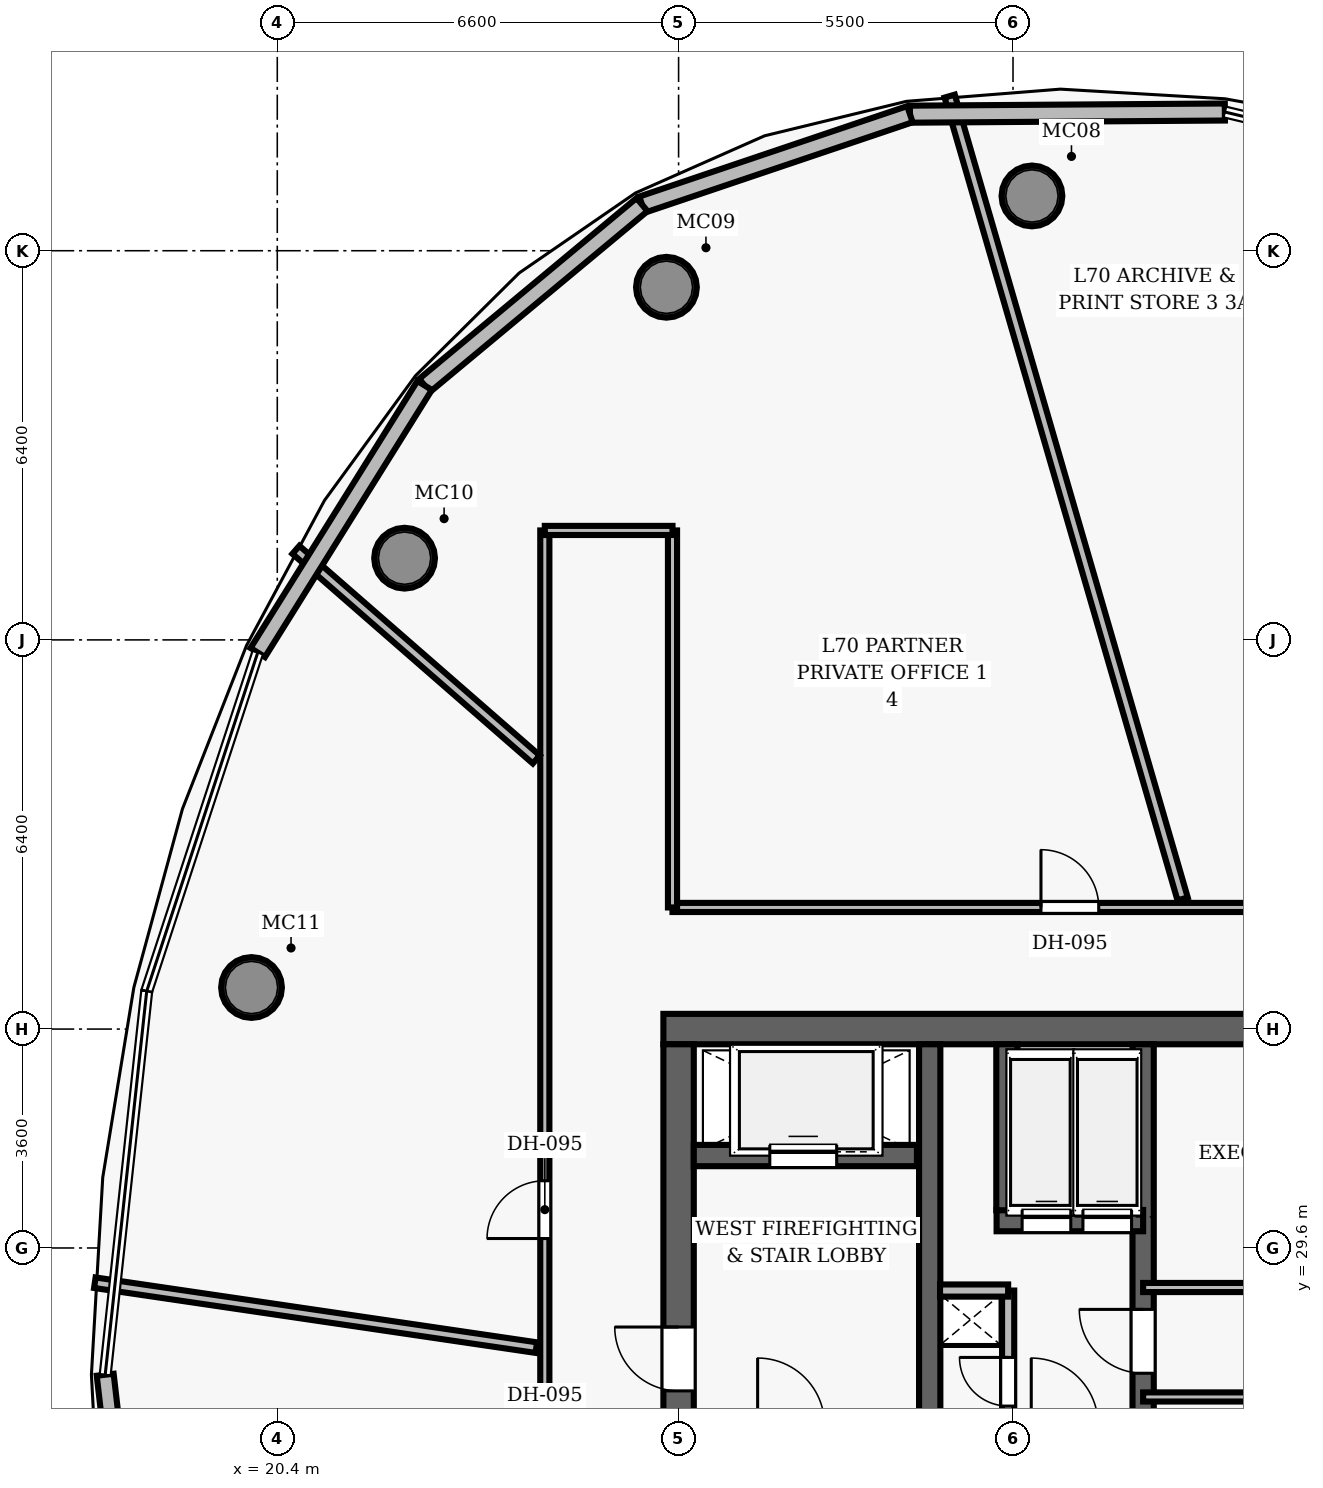
"""IFC4 building model, lengths in metres.
Left out: names, types, materials, properties, quantities, classifications, styles, units other than length and angle.
Written with IfcOpenShell. Run it as: python <this file> out.ifc"""

import sys

from ifc_helpers import new_model, si_unit, direction, frame, frame_2d, origin, origin_2d, place, context, subcontext, project, spatial, rectangle, hollow_circle, extrude, element, fill, save


model = new_model("IFC4")
c1 = context("Model", 3, precision=1e-05, world=origin(), true_north=direction((0.0, 1.0)))
c2 = subcontext(c1, "Body", "Model", "MODEL_VIEW")
j1 = project(units=[si_unit("LENGTHUNIT", "METRE"), si_unit("PLANEANGLEUNIT", "RADIAN")], contexts=[c1])
p1 = place(None, origin())
s1 = spatial("IfcSite", under=j1, at=p1, CompositionType="ELEMENT")
p2 = place(p1, origin())
s2 = spatial("IfcBuilding", under=s1, at=p2, CompositionType="ELEMENT")
p3 = place(p2, frame((0.0, 0.0, 276.7)))
s3 = spatial("IfcBuildingStorey", under=s2, at=p3, CompositionType="ELEMENT", Elevation=276.7)
p4 = place(p3, frame((26.75, 33.2, 0.0), z_axis=(0.0, 0.0, 1.0), x_axis=(1.0, 0.0, 0.0)))
e1 = element("IfcWall", 1, at=p4, inside=s3, PredefinedType="SHEAR", context=c2, shape_type="SweptSolid", body=[
    extrude(rectangle(XDim=22.5, YDim=0.5, at=frame_2d((11.25, 0.0))), origin(), (0.0, 0.0, 1.0), 3.85),
])
p5 = place(p3, frame((27.0, 19.05, 0.0), z_axis=(0.0, 0.0, 1.0), x_axis=(0.0, 1.0, 0.0)))
e2 = element("IfcWall", 2, at=p5, inside=s3, PredefinedType="SHEAR", context=c2, shape_type="SweptSolid", body=[
    extrude(rectangle(XDim=13.9, YDim=0.5, at=frame_2d((6.95, 0.0))), origin(), (0.0, 0.0, 1.0), 3.85),
])
p6 = place(p5, frame((8.2, 0.0, 0.0)))
e3 = element("IfcOpeningElement", 3, at=p6, cuts=e2, PredefinedType="OPENING", context=c2, shape_type="SweptSolid", body=[
    extrude(rectangle(XDim=1.05, YDim=2.15, at=frame_2d((0.525, 1.075))), frame((0.0, 0.26, 0.0), z_axis=(0.0, -1.0, 0.0), x_axis=(1.0, 0.0, 0.0)), (0.0, 0.0, 1.0), 0.52),
])
p7 = place(p3, frame((31.13, 19.05, 0.0), z_axis=(0.0, 0.0, 1.0), x_axis=(0.0, 1.0, 0.0)))
e4 = element("IfcWall", 4, at=p7, inside=s3, PredefinedType="SHEAR", context=c2, shape_type="SweptSolid", body=[
    extrude(rectangle(XDim=13.9, YDim=0.35, at=frame_2d((6.95, 0.0))), origin(), (0.0, 0.0, 1.0), 3.85),
])
for number, where, z_axis, x_axis in (
    (5, (32.812, 46.901, 0.0), (0.0, 0.0, 1.0), (1.0, 0.0, 0.0)),
    (6, (26.8, 45.399, 0.0), (0.0, 0.0, 1.0), (1.0, 0.0, 0.0)),
    (7, (22.494, 40.944, 0.0), (0.0, 0.0, 1.0), (1.0, 0.0, 0.0)),
    (8, (19.976, 33.884, 0.0), (0.0, 0.0, 1.0), (1.0, 0.0, 0.0)),
):
    element("IfcColumn", number, at=place(p3, frame(where, z_axis=z_axis, x_axis=x_axis)), inside=s3, PredefinedType="COLUMN", context=c2, shape_type="SweptSolid", body=[
        extrude(hollow_circle(Radius=0.5, WallThickness=0.045, at=origin_2d()), origin(), (0.0, 0.0, 1.0), 3.85),
    ])
p8 = place(p3, frame((27.25, 31.12, 0.0), z_axis=(0.0, 0.0, 1.0), x_axis=(1.0, 0.0, 0.0)))
e9 = element("IfcWall", 9, at=p8, inside=s3, PredefinedType="SHEAR", context=c2, shape_type="SweptSolid", body=[
    extrude(rectangle(XDim=3.67, YDim=0.35, at=frame_2d((1.835, 0.0))), origin(), (0.0, 0.0, 1.0), 3.04),
])
p9 = place(p8, frame((1.25, 0.0, 0.0)))
e10 = element("IfcOpeningElement", 10, at=p9, cuts=e9, PredefinedType="OPENING", context=c2, shape_type="SweptSolid", body=[
    extrude(rectangle(XDim=1.1, YDim=2.15, at=frame_2d((0.55, 1.075))), frame((0.0, 0.185, 0.0), z_axis=(0.0, -1.0, 0.0), x_axis=(1.0, 0.0, 0.0)), (0.0, 0.0, 1.0), 0.37),
])
p10 = place(p3, frame((34.64, 26.69, 0.0), z_axis=(0.0, 0.0, 1.0), x_axis=(0.0, 1.0, 0.0)))
e11 = element("IfcWall", 11, at=p10, inside=s3, PredefinedType="SHEAR", context=c2, shape_type="SweptSolid", body=[
    extrude(rectangle(XDim=6.26, YDim=0.35, at=frame_2d((3.13, 0.0))), origin(), (0.0, 0.0, 1.0), 3.85),
])
p11 = place(p10, frame((0.85, 0.0, 0.0)))
e12 = element("IfcOpeningElement", 12, at=p11, cuts=e11, PredefinedType="OPENING", context=c2, shape_type="SweptSolid", body=[
    extrude(rectangle(XDim=1.05, YDim=2.15, at=frame_2d((0.525, 1.075))), frame((0.0, 0.185, 0.0), z_axis=(0.0, -1.0, 0.0), x_axis=(1.0, 0.0, 0.0)), (0.0, 0.0, 1.0), 0.37),
])
p12 = place(p3, frame((32.23, 30.05, 0.0), z_axis=(0.0, 0.0, 1.0), x_axis=(1.0, 0.0, 0.0)))
e13 = element("IfcWall", 13, at=p12, inside=s3, PredefinedType="SHEAR", context=c2, shape_type="SweptSolid", body=[
    extrude(rectangle(XDim=2.41, YDim=0.35, at=frame_2d((1.205, 0.0))), origin(), (0.0, 0.0, 1.0), 3.04),
])
p13 = place(p12, frame((0.42, 0.0, 0.0)))
e14 = element("IfcOpeningElement", 14, at=p13, cuts=e13, PredefinedType="OPENING", context=c2, shape_type="SweptSolid", body=[
    extrude(rectangle(XDim=0.8, YDim=2.15, at=frame_2d((0.4, 1.075))), frame((0.0, 0.185, 0.0), z_axis=(0.0, -1.0, 0.0), x_axis=(1.0, 0.0, 0.0)), (0.0, 0.0, 1.0), 0.37),
])
p14 = place(p12, frame((1.42, 0.0, 0.0)))
e15 = element("IfcOpeningElement", 15, at=p14, cuts=e13, PredefinedType="OPENING", context=c2, shape_type="SweptSolid", body=[
    extrude(rectangle(XDim=0.8, YDim=2.15, at=frame_2d((0.4, 1.075))), frame((0.0, 0.185, 0.0), z_axis=(0.0, -1.0, 0.0), x_axis=(1.0, 0.0, 0.0)), (0.0, 0.0, 1.0), 0.37),
])
p15 = place(p3, frame((32.4, 30.22, 0.0), z_axis=(0.0, 0.0, 1.0), x_axis=(0.0, 1.0, 0.0)))
e16 = element("IfcWall", 16, at=p15, inside=s3, PredefinedType="SHEAR", context=c2, shape_type="SweptSolid", body=[
    extrude(rectangle(XDim=2.73, YDim=0.35, at=frame_2d((1.365, 0.0))), origin(), (0.0, 0.0, 1.0), 3.04),
])
p16 = place(p3, frame((32.42, 26.86, 0.0), z_axis=(0.0, 0.0, 1.0), x_axis=(0.0, 1.0, 0.0)))
e17 = element("IfcWall", 17, at=p16, inside=s3, PredefinedType="PARTITIONING", context=c2, shape_type="SweptSolid", body=[
    extrude(rectangle(XDim=2.04, YDim=0.2, at=frame_2d((1.02, 0.0))), origin(), (0.0, 0.0, 1.0), 3.04),
])
p17 = place(p16, frame((0.14, 0.0, 0.0)))
e18 = element("IfcOpeningElement", 18, at=p17, cuts=e17, PredefinedType="OPENING", context=c2, shape_type="SweptSolid", body=[
    extrude(rectangle(XDim=0.8, YDim=2.05, at=frame_2d((0.4, 1.025))), frame((0.0, 0.11, 0.0), z_axis=(0.0, -1.0, 0.0), x_axis=(1.0, 0.0, 0.0)), (0.0, 0.0, 1.0), 0.22),
])
p18 = place(p3, frame((31.3, 28.9, 0.0), z_axis=(0.0, 0.0, 1.0), x_axis=(1.0, 0.0, 0.0)))
e19 = element("IfcWall", 19, at=p18, inside=s3, PredefinedType="PARTITIONING", context=c2, shape_type="SweptSolid", body=[
    extrude(rectangle(XDim=1.12, YDim=0.2, at=frame_2d((0.56, 0.0))), origin(), (0.0, 0.0, 1.0), 3.04),
])
for number, where, z_axis, x_axis in (
    (20, (34.64, 27.15, 0.0), (0.0, 0.0, 1.0), (1.0, 0.0, 0.0)),
    (21, (34.64, 28.95, 0.0), (0.0, 0.0, 1.0), (1.0, 0.0, 0.0)),
):
    element("IfcWall", number, at=place(p3, frame(where, z_axis=z_axis, x_axis=x_axis)), inside=s3, PredefinedType="PARTITIONING", context=c2, shape_type="SweptSolid", body=[
        extrude(rectangle(XDim=6.36, YDim=0.15, at=frame_2d((3.18, 0.0))), origin(), (0.0, 0.0, 1.0), 3.04),
    ])
p19 = place(p3, frame((26.9, 35.2, 0.0), z_axis=(0.0, 0.0, 1.0), x_axis=(1.0, 0.0, 0.0)))
e22 = element("IfcWall", 22, at=p19, inside=s3, PredefinedType="PARTITIONING", context=c2, shape_type="SweptSolid", body=[
    extrude(rectangle(XDim=10.05, YDim=0.15, at=frame_2d((5.025, 0.0))), origin(), (0.0, 0.0, 1.0), 3.04),
])
p20 = place(p19, frame((6.06, 0.0, 0.0)))
e23 = element("IfcOpeningElement", 23, at=p20, cuts=e22, PredefinedType="OPENING", context=c2, shape_type="SweptSolid", body=[
    extrude(rectangle(XDim=0.95, YDim=2.15, at=frame_2d((0.475, 1.075))), frame((0.0, 0.085, 0.0), z_axis=(0.0, -1.0, 0.0), x_axis=(1.0, 0.0, 0.0)), (0.0, 0.0, 1.0), 0.17),
])
p21 = place(p3, frame((24.8, 10.6, 0.0), z_axis=(0.0, 0.0, 1.0), x_axis=(0.0, 1.0, 0.0)))
e24 = element("IfcWall", 24, at=p21, inside=s3, PredefinedType="PARTITIONING", context=c2, shape_type="SweptSolid", body=[
    extrude(rectangle(XDim=30.8, YDim=0.15, at=frame_2d((15.4, 0.0))), origin(), (0.0, 0.0, 1.0), 3.04),
])
p22 = place(p21, frame((19.156, 0.0, 0.0)))
e25 = element("IfcOpeningElement", 25, at=p22, cuts=e24, PredefinedType="OPENING", context=c2, shape_type="SweptSolid", body=[
    extrude(rectangle(XDim=0.95, YDim=2.15, at=frame_2d((0.475, 1.075))), frame((0.0, 0.085, 0.0), z_axis=(0.0, -1.0, 0.0), x_axis=(1.0, 0.0, 0.0)), (0.0, 0.0, 1.0), 0.17),
])
p23 = place(p21, frame((15.034, 0.0, 0.0)))
e26 = element("IfcOpeningElement", 26, at=p23, cuts=e24, PredefinedType="OPENING", context=c2, shape_type="SweptSolid", body=[
    extrude(rectangle(XDim=0.95, YDim=2.15, at=frame_2d((0.475, 1.075))), frame((0.0, 0.085, 0.0), z_axis=(0.0, -1.0, 0.0), x_axis=(1.0, 0.0, 0.0)), (0.0, 0.0, 1.0), 0.17),
])
p24 = place(p21, frame((1.941, 0.0, 0.0)))
e27 = element("IfcOpeningElement", 27, at=p24, cuts=e24, PredefinedType="OPENING", context=c2, shape_type="SweptSolid", body=[
    extrude(rectangle(XDim=0.95, YDim=2.15, at=frame_2d((0.475, 1.075))), frame((0.0, 0.085, 0.0), z_axis=(0.0, -1.0, 0.0), x_axis=(1.0, 0.0, 0.0)), (0.0, 0.0, 1.0), 0.17),
])
p25 = place(p3, frame((26.9, 35.2, 0.0), z_axis=(0.0, 0.0, 1.0), x_axis=(0.0, 1.0, 0.0)))
e28 = element("IfcWall", 28, at=p25, inside=s3, PredefinedType="PARTITIONING", context=c2, shape_type="SweptSolid", body=[
    extrude(rectangle(XDim=6.2, YDim=0.15, at=frame_2d((3.1, 0.0))), origin(), (0.0, 0.0, 1.0), 3.04),
])
p26 = place(p3, frame((24.8, 41.4, 0.0), z_axis=(0.0, 0.0, 1.0), x_axis=(1.0, 0.0, 0.0)))
e29 = element("IfcWall", 29, at=p26, inside=s3, PredefinedType="PARTITIONING", context=c2, shape_type="SweptSolid", body=[
    extrude(rectangle(XDim=2.1, YDim=0.15, at=frame_2d((1.05, 0.0))), origin(), (0.0, 0.0, 1.0), 3.04),
])
p27 = place(p3, frame((35.29, 35.34, 0.0), z_axis=(0.0, 0.0, 1.0), x_axis=(-0.278694485612, 0.960379812204, 0.0)))
e30 = element("IfcWall", 30, at=p27, inside=s3, PredefinedType="PARTITIONING", context=c2, shape_type="SweptSolid", body=[
    extrude(rectangle(XDim=13.747, YDim=0.175, at=frame_2d((6.874, 0.0))), origin(), (0.0, 0.0, 1.0), 3.04),
])
p28 = place(p3, frame((24.66, 37.634, 0.0), z_axis=(0.0, 0.0, 1.0), x_axis=(-0.753676963552, 0.657245033919, 0.0)))
e31 = element("IfcWall", 31, at=p28, inside=s3, PredefinedType="PARTITIONING", context=c2, shape_type="SweptSolid", body=[
    extrude(rectangle(XDim=5.246, YDim=0.175, at=frame_2d((2.623, 0.0))), origin(), (0.0, 0.0, 1.0), 3.04),
])
p29 = place(p3, frame((24.66, 27.961, 0.0), z_axis=(0.0, 0.0, 1.0), x_axis=(-0.989360966301, 0.145481539582, 0.0)))
e32 = element("IfcWall", 32, at=p29, inside=s3, PredefinedType="PARTITIONING", context=c2, shape_type="SweptSolid", body=[
    extrude(rectangle(XDim=7.339, YDim=0.175, at=frame_2d((3.669, 0.0))), origin(), (0.0, 0.0, 1.0), 3.04),
])
p30 = place(p3, frame((30.805, 48.246, 0.0), z_axis=(0.0, 0.0, 1.0), x_axis=(0.999976318175, 0.006882084588, 0.0)))
e33 = element("IfcWall", 33, at=p30, inside=s3, PredefinedType="SOLIDWALL", context=c2, shape_type="SweptSolid", body=[
    extrude(rectangle(XDim=5.179, YDim=0.28, at=frame_2d((2.59, 0.0))), origin(), (0.0, 0.0, 1.0), 3.625),
])
p31 = place(p3, frame((26.399, 46.758, 0.0), z_axis=(0.0, 0.0, 1.0), x_axis=(0.947463644546, 0.319863474414, 0.0)))
e34 = element("IfcWall", 34, at=p31, inside=s3, PredefinedType="SOLIDWALL", context=c2, shape_type="SweptSolid", body=[
    extrude(rectangle(XDim=4.651, YDim=0.28, at=frame_2d((2.325, 0.0))), origin(), (0.0, 0.0, 1.0), 3.625),
])
p32 = place(p3, frame((22.823, 43.785, 0.0), z_axis=(0.0, 0.0, 1.0), x_axis=(0.768892148776, 0.639378497879, 0.0)))
e35 = element("IfcWall", 35, at=p32, inside=s3, PredefinedType="SOLIDWALL", context=c2, shape_type="SweptSolid", body=[
    extrude(rectangle(XDim=4.65, YDim=0.28, at=frame_2d((2.325, 0.0))), origin(), (0.0, 0.0, 1.0), 3.625),
])
p33 = place(p3, frame((20.079, 39.392, 0.0), z_axis=(0.0, 0.0, 1.0), x_axis=(0.529863349089, 0.848083033254, 0.0)))
e36 = element("IfcWall", 36, at=p33, inside=s3, PredefinedType="SOLIDWALL", context=c2, shape_type="SweptSolid", body=[
    extrude(rectangle(XDim=5.179, YDim=0.28, at=frame_2d((2.59, 0.0))), origin(), (0.0, 0.0, 1.0), 3.625),
])
p34 = place(p3, frame((18.319, 21.032, 0.0), z_axis=(0.0, 0.0, 1.0), x_axis=(-0.114811538643, 0.993387291339, 0.0)))
e37 = element("IfcWall", 37, at=p34, inside=s3, PredefinedType="SOLIDWALL", context=c2, shape_type="SweptSolid", body=[
    extrude(rectangle(XDim=6.526, YDim=0.28, at=frame_2d((3.263, 0.0))), origin(), (0.0, 0.0, 1.0), 3.625),
])
p35 = place(p6, origin())
e38 = element("IfcDoor", 38, at=p35, inside=s3, OperationType="SINGLE_SWING_RIGHT", PredefinedType="DOOR", context=c2, shape_type="SweptSolid", body=[
    extrude(rectangle(XDim=1.05, YDim=2.15, at=frame_2d((0.525, 1.075))), frame((0.0, 0.025, 0.0), z_axis=(0.0, -1.0, 0.0), x_axis=(1.0, 0.0, 0.0)), (0.0, 0.0, 1.0), 0.05),
])
fill(e3, e38)
p36 = place(p17, origin())
e39 = element("IfcDoor", 39, at=p36, inside=s3, OperationType="SINGLE_SWING_RIGHT", PredefinedType="DOOR", context=c2, shape_type="SweptSolid", body=[
    extrude(rectangle(XDim=0.8, YDim=2.05, at=frame_2d((0.4, 1.025))), frame((0.0, 0.025, 0.0), z_axis=(0.0, -1.0, 0.0), x_axis=(1.0, 0.0, 0.0)), (0.0, 0.0, 1.0), 0.05),
])
fill(e18, e39)
p37 = place(p11, origin())
e40 = element("IfcDoor", 40, at=p37, inside=s3, OperationType="SINGLE_SWING_RIGHT", PredefinedType="DOOR", context=c2, shape_type="SweptSolid", body=[
    extrude(rectangle(XDim=1.05, YDim=2.15, at=frame_2d((0.525, 1.075))), frame((0.0, 0.025, 0.0), z_axis=(0.0, -1.0, 0.0), x_axis=(1.0, 0.0, 0.0)), (0.0, 0.0, 1.0), 0.05),
])
fill(e12, e40)
p38 = place(p20, origin())
e41 = element("IfcDoor", 41, at=p38, inside=s3, OperationType="SINGLE_SWING_LEFT", PredefinedType="DOOR", context=c2, shape_type="SweptSolid", body=[
    extrude(rectangle(XDim=0.95, YDim=2.15, at=frame_2d((0.475, 1.075))), frame((0.0, 0.025, 0.0), z_axis=(0.0, -1.0, 0.0), x_axis=(1.0, 0.0, 0.0)), (0.0, 0.0, 1.0), 0.05),
])
fill(e23, e41)
p39 = place(p22, origin())
e42 = element("IfcDoor", 42, at=p39, inside=s3, OperationType="SINGLE_SWING_LEFT", PredefinedType="DOOR", context=c2, shape_type="SweptSolid", body=[
    extrude(rectangle(XDim=0.95, YDim=2.15, at=frame_2d((0.475, 1.075))), frame((0.0, 0.025, 0.0), z_axis=(0.0, -1.0, 0.0), x_axis=(1.0, 0.0, 0.0)), (0.0, 0.0, 1.0), 0.05),
])
fill(e25, e42)
p40 = place(p9, origin())
e43 = element("IfcDoor", 43, at=p40, inside=s3, OperationType="SLIDING_TO_LEFT", PredefinedType="DOOR", context=c2, shape_type="SweptSolid", body=[
    extrude(rectangle(XDim=1.1, YDim=2.15, at=frame_2d((0.55, 1.075))), frame((0.0, 0.025, 0.0), z_axis=(0.0, -1.0, 0.0), x_axis=(1.0, 0.0, 0.0)), (0.0, 0.0, 1.0), 0.05),
])
fill(e10, e43)
p41 = place(p13, origin())
e44 = element("IfcDoor", 44, at=p41, inside=s3, OperationType="SLIDING_TO_LEFT", PredefinedType="DOOR", context=c2, shape_type="SweptSolid", body=[
    extrude(rectangle(XDim=0.8, YDim=2.15, at=frame_2d((0.4, 1.075))), frame((0.0, 0.025, 0.0), z_axis=(0.0, -1.0, 0.0), x_axis=(1.0, 0.0, 0.0)), (0.0, 0.0, 1.0), 0.05),
])
fill(e14, e44)
p42 = place(p14, origin())
e45 = element("IfcDoor", 45, at=p42, inside=s3, OperationType="SLIDING_TO_LEFT", PredefinedType="DOOR", context=c2, shape_type="SweptSolid", body=[
    extrude(rectangle(XDim=0.8, YDim=2.15, at=frame_2d((0.4, 1.075))), frame((0.0, 0.025, 0.0), z_axis=(0.0, -1.0, 0.0), x_axis=(1.0, 0.0, 0.0)), (0.0, 0.0, 1.0), 0.05),
])
fill(e15, e45)
save(model, sys.argv[1])
